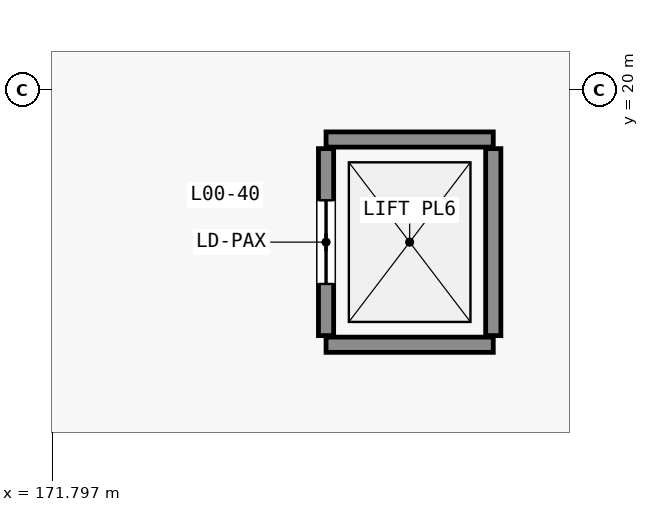
"""IFC4 building model, lengths in metres.
Left out: names, types, materials, properties, quantities, classifications, styles, units other than length and angle.
Written with IfcOpenShell. Run it as: python <this file> out.ifc"""

import sys

from ifc_helpers import new_model, si_unit, direction, frame, frame_2d, origin, place, context, subcontext, project, spatial, rectangle, extrude, element, fill, save


model = new_model("IFC4")
c1 = context("Model", 3, precision=1e-05, world=origin(), true_north=direction((0.0, 1.0)))
c2 = subcontext(c1, "Body", "Model", "MODEL_VIEW")
j1 = project(units=[si_unit("LENGTHUNIT", "METRE"), si_unit("PLANEANGLEUNIT", "RADIAN")], contexts=[c1])
p1 = place(None, origin())
s1 = spatial("IfcSite", under=j1, at=p1, CompositionType="ELEMENT")
p2 = place(p1, origin())
s2 = spatial("IfcBuilding", under=s1, at=p2, CompositionType="ELEMENT")
p3 = place(p2, origin())
s3 = spatial("IfcBuildingStorey", under=s2, at=p3, CompositionType="ELEMENT", Elevation=0.0)
for number, where, z_axis, x_axis in (
    (1, (175.4, 16.65, 0.0), (0.0, 0.0, 1.0), (1.0, 0.0, 0.0)),
    (2, (175.4, 19.35, 0.0), (0.0, 0.0, 1.0), (1.0, 0.0, 0.0)),
):
    element("IfcWall", number, at=place(p3, frame(where, z_axis=z_axis, x_axis=x_axis)), inside=s3, PredefinedType="STANDARD", context=c2, shape_type="SweptSolid", body=[
        extrude(rectangle(XDim=2.2, YDim=0.2, at=frame_2d((1.1, 0.0))), origin(), (0.0, 0.0, 1.0), 5.62),
    ])
p4 = place(p3, frame((175.4, 16.77, 0.0), z_axis=(0.0, 0.0, 1.0), x_axis=(0.0, 1.0, 0.0)))
e3 = element("IfcWall", 3, at=p4, inside=s3, PredefinedType="STANDARD", context=c2, shape_type="SweptSolid", body=[
    extrude(rectangle(XDim=2.46, YDim=0.2, at=frame_2d((1.23, 0.0))), origin(), (0.0, 0.0, 1.0), 5.62),
])
p5 = place(p4, frame((0.68, 0.0, 0.0)))
e4 = element("IfcOpeningElement", 4, at=p5, cuts=e3, PredefinedType="OPENING", context=c2, shape_type="SweptSolid", body=[
    extrude(rectangle(XDim=1.1, YDim=2.15, at=frame_2d((0.55, 1.075))), frame((0.0, 0.11, 0.0), z_axis=(0.0, -1.0, 0.0), x_axis=(1.0, 0.0, 0.0)), (0.0, 0.0, 1.0), 0.22),
])
p6 = place(p3, frame((177.6, 16.77, 0.0), z_axis=(0.0, 0.0, 1.0), x_axis=(0.0, 1.0, 0.0)))
e5 = element("IfcWall", 5, at=p6, inside=s3, PredefinedType="STANDARD", context=c2, shape_type="SweptSolid", body=[
    extrude(rectangle(XDim=2.46, YDim=0.2, at=frame_2d((1.23, 0.0))), origin(), (0.0, 0.0, 1.0), 5.62),
])
p7 = place(p5, origin())
e6 = element("IfcDoor", 6, at=p7, inside=s3, OperationType="SLIDING_TO_LEFT", PredefinedType="DOOR", context=c2, shape_type="SweptSolid", body=[
    extrude(rectangle(XDim=1.1, YDim=2.15, at=frame_2d((0.55, 1.075))), frame((0.0, 0.025, 0.0), z_axis=(0.0, -1.0, 0.0), x_axis=(1.0, 0.0, 0.0)), (0.0, 0.0, 1.0), 0.05),
])
fill(e4, e6)
save(model, sys.argv[1])
